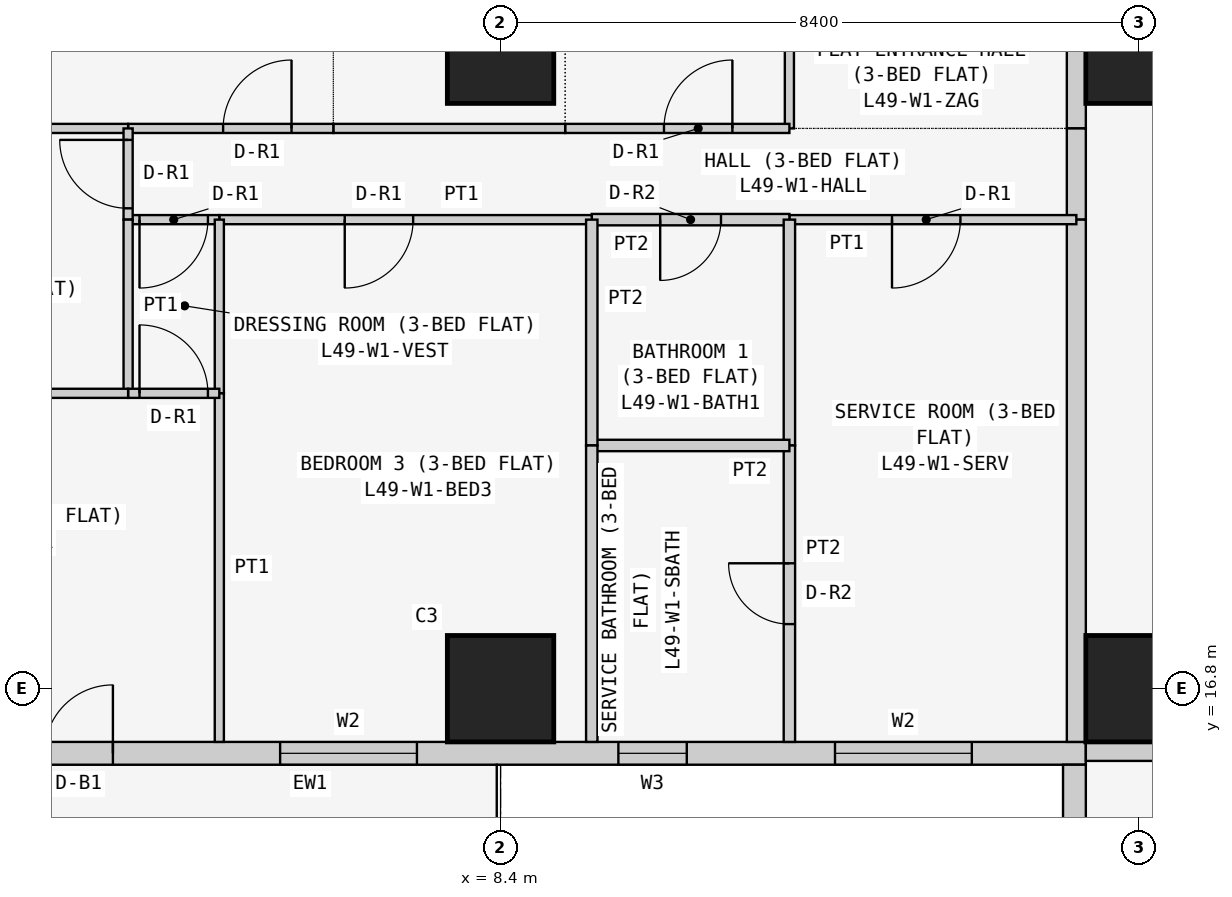
"""IFC4 building model, lengths in metres.
Left out: names, types, materials, properties, quantities, classifications, styles, units other than length and angle.
Written with IfcOpenShell. Run it as: python <this file> out.ifc"""

import sys

from ifc_helpers import new_model, si_unit, direction, frame, frame_2d, origin, origin_2d, place, context, subcontext, project, spatial, rectangle, extrude, element, fill, save


model = new_model("IFC4")
c1 = context("Model", 3, precision=1e-05, world=origin(), true_north=direction((0.0, 1.0)))
c2 = subcontext(c1, "Body", "Model", "MODEL_VIEW")
j1 = project(units=[si_unit("LENGTHUNIT", "METRE"), si_unit("PLANEANGLEUNIT", "RADIAN")], contexts=[c1])
p1 = place(None, origin())
s1 = spatial("IfcSite", under=j1, at=p1, CompositionType="ELEMENT")
p2 = place(p1, origin())
s2 = spatial("IfcBuilding", under=s1, at=p2, CompositionType="ELEMENT")
p3 = place(p2, frame((0.0, 0.0, 190.5)))
s3 = spatial("IfcBuildingStorey", under=s2, at=p3, CompositionType="ELEMENT", Elevation=190.5)
for number, where, z_axis, x_axis in (
    (1, (8.4, 16.8, 0.0), (0.0, 0.0, 1.0), (1.0, 0.0, 0.0)),
    (2, (8.4, 25.2, 0.0), (0.0, 0.0, 1.0), (1.0, 0.0, 0.0)),
    (3, (16.8, 16.8, 0.0), (0.0, 0.0, 1.0), (1.0, 0.0, 0.0)),
    (4, (16.8, 25.2, 0.0), (0.0, 0.0, 1.0), (1.0, 0.0, 0.0)),
):
    element("IfcColumn", number, at=place(p3, frame(where, z_axis=z_axis, x_axis=x_axis)), inside=s3, PredefinedType="COLUMN", context=c2, shape_type="SweptSolid", body=[
        extrude(rectangle(XDim=1.4, YDim=1.4, at=origin_2d()), origin(), (0.0, 0.0, 1.0), 3.6),
    ])
p4 = place(p3, frame((0.4, 15.95, 0.0), z_axis=(0.0, 0.0, 1.0), x_axis=(1.0, 0.0, 0.0)))
e5 = element("IfcWall", 5, at=p4, inside=s3, PredefinedType="SOLIDWALL", context=c2, shape_type="SweptSolid", body=[
    extrude(rectangle(XDim=15.7, YDim=0.3, at=frame_2d((7.85, 0.0))), origin(), (0.0, 0.0, 1.0), 3.45),
])
p5 = place(p4, frame((12.4, 0.0, 0.9)))
e6 = element("IfcOpeningElement", 6, at=p5, cuts=e5, PredefinedType="OPENING", context=c2, shape_type="SweptSolid", body=[
    extrude(rectangle(XDim=1.8, YDim=1.5, at=frame_2d((0.9, 0.75))), frame((0.0, 0.16, 0.0), z_axis=(0.0, -1.0, 0.0), x_axis=(1.0, 0.0, 0.0)), (0.0, 0.0, 1.0), 0.32),
])
p6 = place(p4, frame((9.55, 0.0, 1.5)))
e7 = element("IfcOpeningElement", 7, at=p6, cuts=e5, PredefinedType="OPENING", context=c2, shape_type="SweptSolid", body=[
    extrude(rectangle(XDim=0.9, YDim=0.7, at=frame_2d((0.45, 0.35))), frame((0.0, 0.16, 0.0), z_axis=(0.0, -1.0, 0.0), x_axis=(1.0, 0.0, 0.0)), (0.0, 0.0, 1.0), 0.32),
])
p7 = place(p4, frame((5.1, 0.0, 0.9)))
e8 = element("IfcOpeningElement", 8, at=p7, cuts=e5, PredefinedType="OPENING", context=c2, shape_type="SweptSolid", body=[
    extrude(rectangle(XDim=1.8, YDim=1.5, at=frame_2d((0.9, 0.75))), frame((0.0, 0.16, 0.0), z_axis=(0.0, -1.0, 0.0), x_axis=(1.0, 0.0, 0.0)), (0.0, 0.0, 1.0), 0.32),
])
p8 = place(p4, frame((2.0, 0.0, 0.0)))
e9 = element("IfcOpeningElement", 9, at=p8, cuts=e5, PredefinedType="OPENING", context=c2, shape_type="SweptSolid", body=[
    extrude(rectangle(XDim=0.9, YDim=2.4, at=frame_2d((0.45, 1.2))), frame((0.0, 0.16, 0.0), z_axis=(0.0, -1.0, 0.0), x_axis=(1.0, 0.0, 0.0)), (0.0, 0.0, 1.0), 0.32),
])
p9 = place(p4, frame((0.7, 0.0, 0.9)))
e10 = element("IfcOpeningElement", 10, at=p9, cuts=e5, PredefinedType="OPENING", context=c2, shape_type="SweptSolid", body=[
    extrude(rectangle(XDim=1.2, YDim=1.5, at=frame_2d((0.6, 0.75))), frame((0.0, 0.16, 0.0), z_axis=(0.0, -1.0, 0.0), x_axis=(1.0, 0.0, 0.0)), (0.0, 0.0, 1.0), 0.32),
])
p10 = place(p3, frame((15.95, 15.8, 0.0), z_axis=(0.0, 0.0, 1.0), x_axis=(0.0, -1.0, 0.0)))
e11 = element("IfcWall", 11, at=p10, inside=s3, PredefinedType="SOLIDWALL", context=c2, shape_type="SweptSolid", body=[
    extrude(rectangle(XDim=7.0, YDim=0.3, at=frame_2d((3.5, 0.0))), origin(), (0.0, 0.0, 1.0), 3.45),
])
p11 = place(p10, frame((1.5, 0.0, 0.9)))
e12 = element("IfcOpeningElement", 12, at=p11, cuts=e11, PredefinedType="OPENING", context=c2, shape_type="SweptSolid", body=[
    extrude(rectangle(XDim=2.4, YDim=1.5, at=frame_2d((1.2, 0.75))), frame((0.0, 0.16, 0.0), z_axis=(0.0, -1.0, 0.0), x_axis=(1.0, 0.0, 0.0)), (0.0, 0.0, 1.0), 0.32),
])
p12 = place(p10, frame((5.05, 0.0, 0.9)))
e13 = element("IfcOpeningElement", 13, at=p12, cuts=e11, PredefinedType="OPENING", context=c2, shape_type="SweptSolid", body=[
    extrude(rectangle(XDim=1.2, YDim=1.5, at=frame_2d((0.6, 0.75))), frame((0.0, 0.16, 0.0), z_axis=(0.0, -1.0, 0.0), x_axis=(1.0, 0.0, 0.0)), (0.0, 0.0, 1.0), 0.32),
])
p13 = place(p3, frame((22.971, 15.975, 0.0), z_axis=(0.0, 0.0, 1.0), x_axis=(-1.0, 0.0, 0.0)))
e14 = element("IfcWall", 14, at=p13, inside=s3, PredefinedType="PARTITIONING", context=c2, shape_type="SweptSolid", body=[
    extrude(rectangle(XDim=6.871, YDim=0.25, at=frame_2d((3.436, 0.0))), origin(), (0.0, 0.0, 1.0), 3.45),
])
p14 = place(p3, frame((15.975, 24.171, 0.0), z_axis=(0.0, 0.0, 1.0), x_axis=(0.0, 1.0, 0.0)))
e15 = element("IfcWall", 15, at=p14, inside=s3, PredefinedType="PARTITIONING", context=c2, shape_type="SweptSolid", body=[
    extrude(rectangle(XDim=5.229, YDim=0.25, at=frame_2d((2.615, 0.0))), origin(), (0.0, 0.0, 1.0), 3.45),
])
p15 = place(p14, frame((2.129, 0.0, 0.0)))
e16 = element("IfcOpeningElement", 16, at=p15, cuts=e15, PredefinedType="OPENING", context=c2, shape_type="SweptSolid", body=[
    extrude(rectangle(XDim=1.0, YDim=2.1, at=frame_2d((0.5, 1.05))), frame((0.0, 0.135, 0.0), z_axis=(0.0, -1.0, 0.0), x_axis=(1.0, 0.0, 0.0)), (0.0, 0.0, 1.0), 0.27),
])
p16 = place(p3, frame((15.975, 22.971, 0.0), z_axis=(0.0, 0.0, 1.0), x_axis=(0.0, 1.0, 0.0)))
e17 = element("IfcWall", 17, at=p16, inside=s3, PredefinedType="PARTITIONING", context=c2, shape_type="SweptSolid", body=[
    extrude(rectangle(XDim=1.2, YDim=0.25, at=frame_2d((0.6, 0.0))), origin(), (0.0, 0.0, 1.0), 3.45),
])
p17 = place(p3, frame((15.975, 16.1, 0.0), z_axis=(0.0, 0.0, 1.0), x_axis=(0.0, 1.0, 0.0)))
e18 = element("IfcWall", 18, at=p17, inside=s3, PredefinedType="PARTITIONING", context=c2, shape_type="SweptSolid", body=[
    extrude(rectangle(XDim=6.871, YDim=0.25, at=frame_2d((3.436, 0.0))), origin(), (0.0, 0.0, 1.0), 3.45),
])
p18 = place(p3, frame((12.2, 29.4, 0.0), z_axis=(0.0, 0.0, 1.0), x_axis=(0.0, -1.0, 0.0)))
e19 = element("IfcWall", 19, at=p18, inside=s3, PredefinedType="PARTITIONING", context=c2, shape_type="SweptSolid", body=[
    extrude(rectangle(XDim=5.229, YDim=0.12, at=frame_2d((2.615, 0.0))), origin(), (0.0, 0.0, 1.0), 3.45),
])
p19 = place(p3, frame((9.25, 24.171, 0.0), z_axis=(0.0, 0.0, 1.0), x_axis=(1.0, 0.0, 0.0)))
e20 = element("IfcWall", 20, at=p19, inside=s3, PredefinedType="PARTITIONING", context=c2, shape_type="SweptSolid", body=[
    extrude(rectangle(XDim=2.95, YDim=0.12, at=frame_2d((1.475, 0.0))), origin(), (0.0, 0.0, 1.0), 3.45),
])
p20 = place(p19, frame((1.3, 0.0, 0.0)))
e21 = element("IfcOpeningElement", 21, at=p20, cuts=e20, PredefinedType="OPENING", context=c2, shape_type="SweptSolid", body=[
    extrude(rectangle(XDim=0.9, YDim=2.1, at=frame_2d((0.45, 1.05))), frame((0.0, 0.07, 0.0), z_axis=(0.0, -1.0, 0.0), x_axis=(1.0, 0.0, 0.0)), (0.0, 0.0, 1.0), 0.14),
])
p21 = place(p3, frame((6.2, 24.171, 0.0), z_axis=(0.0, 0.0, 1.0), x_axis=(1.0, 0.0, 0.0)))
e22 = element("IfcWall", 22, at=p21, inside=s3, PredefinedType="PARTITIONING", context=c2, shape_type="SweptSolid", body=[
    extrude(rectangle(XDim=3.05, YDim=0.12, at=frame_2d((1.525, 0.0))), origin(), (0.0, 0.0, 1.0), 3.45),
])
p22 = place(p3, frame((3.5, 24.171, 0.0), z_axis=(0.0, 0.0, 1.0), x_axis=(1.0, 0.0, 0.0)))
e23 = element("IfcWall", 23, at=p22, inside=s3, PredefinedType="PARTITIONING", context=c2, shape_type="SweptSolid", body=[
    extrude(rectangle(XDim=2.7, YDim=0.12, at=frame_2d((1.35, 0.0))), origin(), (0.0, 0.0, 1.0), 3.45),
])
p23 = place(p22, frame((1.25, 0.0, 0.0)))
e24 = element("IfcOpeningElement", 24, at=p23, cuts=e23, PredefinedType="OPENING", context=c2, shape_type="SweptSolid", body=[
    extrude(rectangle(XDim=0.9, YDim=2.1, at=frame_2d((0.45, 1.05))), frame((0.0, 0.07, 0.0), z_axis=(0.0, -1.0, 0.0), x_axis=(1.0, 0.0, 0.0)), (0.0, 0.0, 1.0), 0.14),
])
p24 = place(p3, frame((-0.65, 24.171, 0.0), z_axis=(0.0, 0.0, 1.0), x_axis=(1.0, 0.0, 0.0)))
e25 = element("IfcWall", 25, at=p24, inside=s3, PredefinedType="PARTITIONING", context=c2, shape_type="SweptSolid", body=[
    extrude(rectangle(XDim=4.15, YDim=0.12, at=frame_2d((2.075, 0.0))), origin(), (0.0, 0.0, 1.0), 3.45),
])
p25 = place(p3, frame((12.2, 22.971, 0.0), z_axis=(0.0, 0.0, 1.0), x_axis=(1.0, 0.0, 0.0)))
e26 = element("IfcWall", 26, at=p25, inside=s3, PredefinedType="PARTITIONING", context=c2, shape_type="SweptSolid", body=[
    extrude(rectangle(XDim=3.775, YDim=0.12, at=frame_2d((1.888, 0.0))), origin(), (0.0, 0.0, 1.0), 3.45),
])
p26 = place(p25, frame((1.35, 0.0, 0.0)))
e27 = element("IfcOpeningElement", 27, at=p26, cuts=e26, PredefinedType="OPENING", context=c2, shape_type="SweptSolid", body=[
    extrude(rectangle(XDim=0.9, YDim=2.1, at=frame_2d((0.45, 1.05))), frame((0.0, 0.07, 0.0), z_axis=(0.0, -1.0, 0.0), x_axis=(1.0, 0.0, 0.0)), (0.0, 0.0, 1.0), 0.14),
])
p27 = place(p3, frame((9.6, 22.971, 0.0), z_axis=(0.0, 0.0, 1.0), x_axis=(1.0, 0.0, 0.0)))
e28 = element("IfcWall", 28, at=p27, inside=s3, PredefinedType="PARTITIONING", context=c2, shape_type="SweptSolid", body=[
    extrude(rectangle(XDim=2.6, YDim=0.15, at=frame_2d((1.3, 0.0))), origin(), (0.0, 0.0, 1.0), 3.45),
])
p28 = place(p27, frame((0.9, 0.0, 0.0)))
e29 = element("IfcOpeningElement", 29, at=p28, cuts=e28, PredefinedType="OPENING", context=c2, shape_type="SweptSolid", body=[
    extrude(rectangle(XDim=0.8, YDim=2.1, at=frame_2d((0.4, 1.05))), frame((0.0, 0.085, 0.0), z_axis=(0.0, -1.0, 0.0), x_axis=(1.0, 0.0, 0.0)), (0.0, 0.0, 1.0), 0.17),
])
p29 = place(p3, frame((4.7, 22.971, 0.0), z_axis=(0.0, 0.0, 1.0), x_axis=(1.0, 0.0, 0.0)))
e30 = element("IfcWall", 30, at=p29, inside=s3, PredefinedType="PARTITIONING", context=c2, shape_type="SweptSolid", body=[
    extrude(rectangle(XDim=4.9, YDim=0.12, at=frame_2d((2.45, 0.0))), origin(), (0.0, 0.0, 1.0), 3.45),
])
p30 = place(p29, frame((1.65, 0.0, 0.0)))
e31 = element("IfcOpeningElement", 31, at=p30, cuts=e30, PredefinedType="OPENING", context=c2, shape_type="SweptSolid", body=[
    extrude(rectangle(XDim=0.9, YDim=2.1, at=frame_2d((0.45, 1.05))), frame((0.0, 0.07, 0.0), z_axis=(0.0, -1.0, 0.0), x_axis=(1.0, 0.0, 0.0)), (0.0, 0.0, 1.0), 0.14),
])
p31 = place(p3, frame((3.5, 22.971, 0.0), z_axis=(0.0, 0.0, 1.0), x_axis=(1.0, 0.0, 0.0)))
e32 = element("IfcWall", 32, at=p31, inside=s3, PredefinedType="PARTITIONING", context=c2, shape_type="SweptSolid", body=[
    extrude(rectangle(XDim=1.2, YDim=0.12, at=frame_2d((0.6, 0.0))), origin(), (0.0, 0.0, 1.0), 3.45),
])
p32 = place(p31, frame((0.15, 0.0, 0.0)))
e33 = element("IfcOpeningElement", 33, at=p32, cuts=e32, PredefinedType="OPENING", context=c2, shape_type="SweptSolid", body=[
    extrude(rectangle(XDim=0.9, YDim=2.1, at=frame_2d((0.45, 1.05))), frame((0.0, 0.07, 0.0), z_axis=(0.0, -1.0, 0.0), x_axis=(1.0, 0.0, 0.0)), (0.0, 0.0, 1.0), 0.14),
])
p33 = place(p3, frame((3.5, 24.171, 0.0), z_axis=(0.0, 0.0, 1.0), x_axis=(0.0, -1.0, 0.0)))
e34 = element("IfcWall", 34, at=p33, inside=s3, PredefinedType="PARTITIONING", context=c2, shape_type="SweptSolid", body=[
    extrude(rectangle(XDim=1.2, YDim=0.12, at=frame_2d((0.6, 0.0))), origin(), (0.0, 0.0, 1.0), 3.45),
])
p34 = place(p33, frame((0.151, 0.0, 0.0)))
e35 = element("IfcOpeningElement", 35, at=p34, cuts=e34, PredefinedType="OPENING", context=c2, shape_type="SweptSolid", body=[
    extrude(rectangle(XDim=0.9, YDim=2.1, at=frame_2d((0.45, 1.05))), frame((0.0, 0.07, 0.0), z_axis=(0.0, -1.0, 0.0), x_axis=(1.0, 0.0, 0.0)), (0.0, 0.0, 1.0), 0.14),
])
p35 = place(p3, frame((12.2, 22.971, 0.0), z_axis=(0.0, 0.0, 1.0), x_axis=(0.0, -1.0, 0.0)))
e36 = element("IfcWall", 36, at=p35, inside=s3, PredefinedType="PARTITIONING", context=c2, shape_type="SweptSolid", body=[
    extrude(rectangle(XDim=2.971, YDim=0.15, at=frame_2d((1.485, 0.0))), origin(), (0.0, 0.0, 1.0), 3.45),
])
p36 = place(p3, frame((12.2, 20.0, 0.0), z_axis=(0.0, 0.0, 1.0), x_axis=(0.0, -1.0, 0.0)))
e37 = element("IfcWall", 37, at=p36, inside=s3, PredefinedType="PARTITIONING", context=c2, shape_type="SweptSolid", body=[
    extrude(rectangle(XDim=3.9, YDim=0.15, at=frame_2d((1.95, 0.0))), origin(), (0.0, 0.0, 1.0), 3.45),
])
p37 = place(p36, frame((1.55, 0.0, 0.0)))
e38 = element("IfcOpeningElement", 38, at=p37, cuts=e37, PredefinedType="OPENING", context=c2, shape_type="SweptSolid", body=[
    extrude(rectangle(XDim=0.8, YDim=2.1, at=frame_2d((0.4, 1.05))), frame((0.0, 0.085, 0.0), z_axis=(0.0, -1.0, 0.0), x_axis=(1.0, 0.0, 0.0)), (0.0, 0.0, 1.0), 0.17),
])
p38 = place(p3, frame((9.6, 20.0, 0.0), z_axis=(0.0, 0.0, 1.0), x_axis=(1.0, 0.0, 0.0)))
e39 = element("IfcWall", 39, at=p38, inside=s3, PredefinedType="PARTITIONING", context=c2, shape_type="SweptSolid", body=[
    extrude(rectangle(XDim=2.6, YDim=0.15, at=frame_2d((1.3, 0.0))), origin(), (0.0, 0.0, 1.0), 3.45),
])
p39 = place(p3, frame((9.6, 22.971, 0.0), z_axis=(0.0, 0.0, 1.0), x_axis=(0.0, -1.0, 0.0)))
e40 = element("IfcWall", 40, at=p39, inside=s3, PredefinedType="PARTITIONING", context=c2, shape_type="SweptSolid", body=[
    extrude(rectangle(XDim=2.971, YDim=0.15, at=frame_2d((1.485, 0.0))), origin(), (0.0, 0.0, 1.0), 3.45),
])
p40 = place(p3, frame((9.6, 20.0, 0.0), z_axis=(0.0, 0.0, 1.0), x_axis=(0.0, -1.0, 0.0)))
e41 = element("IfcWall", 41, at=p40, inside=s3, PredefinedType="PARTITIONING", context=c2, shape_type="SweptSolid", body=[
    extrude(rectangle(XDim=3.9, YDim=0.15, at=frame_2d((1.95, 0.0))), origin(), (0.0, 0.0, 1.0), 3.45),
])
p41 = place(p3, frame((4.7, 22.971, 0.0), z_axis=(0.0, 0.0, 1.0), x_axis=(0.0, -1.0, 0.0)))
e42 = element("IfcWall", 42, at=p41, inside=s3, PredefinedType="PARTITIONING", context=c2, shape_type="SweptSolid", body=[
    extrude(rectangle(XDim=2.285, YDim=0.12, at=frame_2d((1.143, 0.0))), origin(), (0.0, 0.0, 1.0), 3.45),
])
p42 = place(p3, frame((4.7, 20.686, 0.0), z_axis=(0.0, 0.0, 1.0), x_axis=(0.0, -1.0, 0.0)))
e43 = element("IfcWall", 43, at=p42, inside=s3, PredefinedType="PARTITIONING", context=c2, shape_type="SweptSolid", body=[
    extrude(rectangle(XDim=4.586, YDim=0.12, at=frame_2d((2.293, 0.0))), origin(), (0.0, 0.0, 1.0), 3.45),
])
p43 = place(p3, frame((3.5, 22.971, 0.0), z_axis=(0.0, 0.0, 1.0), x_axis=(0.0, -1.0, 0.0)))
e44 = element("IfcWall", 44, at=p43, inside=s3, PredefinedType="PARTITIONING", context=c2, shape_type="SweptSolid", body=[
    extrude(rectangle(XDim=2.285, YDim=0.12, at=frame_2d((1.143, 0.0))), origin(), (0.0, 0.0, 1.0), 3.45),
])
p44 = place(p3, frame((3.5, 20.686, 0.0), z_axis=(0.0, 0.0, 1.0), x_axis=(1.0, 0.0, 0.0)))
e45 = element("IfcWall", 45, at=p44, inside=s3, PredefinedType="PARTITIONING", context=c2, shape_type="SweptSolid", body=[
    extrude(rectangle(XDim=1.2, YDim=0.12, at=frame_2d((0.6, 0.0))), origin(), (0.0, 0.0, 1.0), 3.45),
])
p45 = place(p44, frame((0.15, 0.0, 0.0)))
e46 = element("IfcOpeningElement", 46, at=p45, cuts=e45, PredefinedType="OPENING", context=c2, shape_type="SweptSolid", body=[
    extrude(rectangle(XDim=0.9, YDim=2.1, at=frame_2d((0.45, 1.05))), frame((0.0, 0.07, 0.0), z_axis=(0.0, -1.0, 0.0), x_axis=(1.0, 0.0, 0.0)), (0.0, 0.0, 1.0), 0.14),
])
p46 = place(p3, frame((-0.65, 20.686, 0.0), z_axis=(0.0, 0.0, 1.0), x_axis=(1.0, 0.0, 0.0)))
e47 = element("IfcWall", 47, at=p46, inside=s3, PredefinedType="PARTITIONING", context=c2, shape_type="SweptSolid", body=[
    extrude(rectangle(XDim=4.15, YDim=0.12, at=frame_2d((2.075, 0.0))), origin(), (0.0, 0.0, 1.0), 3.45),
])
p47 = place(p5, origin())
e48 = element("IfcWindow", 48, at=p47, inside=s3, PartitioningType="SINGLE_PANEL", PredefinedType="WINDOW", context=c2, shape_type="SweptSolid", body=[
    extrude(rectangle(XDim=1.8, YDim=1.5, at=frame_2d((0.9, 0.75))), frame((0.0, 0.03, 0.0), z_axis=(0.0, -1.0, 0.0), x_axis=(1.0, 0.0, 0.0)), (0.0, 0.0, 1.0), 0.06),
])
fill(e6, e48)
p48 = place(p6, origin())
e49 = element("IfcWindow", 49, at=p48, inside=s3, PartitioningType="SINGLE_PANEL", PredefinedType="WINDOW", context=c2, shape_type="SweptSolid", body=[
    extrude(rectangle(XDim=0.9, YDim=0.7, at=frame_2d((0.45, 0.35))), frame((0.0, 0.03, 0.0), z_axis=(0.0, -1.0, 0.0), x_axis=(1.0, 0.0, 0.0)), (0.0, 0.0, 1.0), 0.06),
])
fill(e7, e49)
p49 = place(p7, origin())
e50 = element("IfcWindow", 50, at=p49, inside=s3, PartitioningType="SINGLE_PANEL", PredefinedType="WINDOW", context=c2, shape_type="SweptSolid", body=[
    extrude(rectangle(XDim=1.8, YDim=1.5, at=frame_2d((0.9, 0.75))), frame((0.0, 0.03, 0.0), z_axis=(0.0, -1.0, 0.0), x_axis=(1.0, 0.0, 0.0)), (0.0, 0.0, 1.0), 0.06),
])
fill(e8, e50)
p50 = place(p8, origin())
e51 = element("IfcDoor", 51, at=p50, inside=s3, OperationType="SINGLE_SWING_RIGHT", PredefinedType="DOOR", context=c2, shape_type="SweptSolid", body=[
    extrude(rectangle(XDim=0.9, YDim=2.4, at=frame_2d((0.45, 1.2))), frame((0.0, 0.025, 0.0), z_axis=(0.0, -1.0, 0.0), x_axis=(1.0, 0.0, 0.0)), (0.0, 0.0, 1.0), 0.05),
])
fill(e9, e51)
p51 = place(p20, origin())
e52 = element("IfcDoor", 52, at=p51, inside=s3, OperationType="SINGLE_SWING_RIGHT", PredefinedType="DOOR", context=c2, shape_type="SweptSolid", body=[
    extrude(rectangle(XDim=0.9, YDim=2.1, at=frame_2d((0.45, 1.05))), frame((0.0, 0.025, 0.0), z_axis=(0.0, -1.0, 0.0), x_axis=(1.0, 0.0, 0.0)), (0.0, 0.0, 1.0), 0.05),
])
fill(e21, e52)
p52 = place(p23, origin())
e53 = element("IfcDoor", 53, at=p52, inside=s3, OperationType="SINGLE_SWING_RIGHT", PredefinedType="DOOR", context=c2, shape_type="SweptSolid", body=[
    extrude(rectangle(XDim=0.9, YDim=2.1, at=frame_2d((0.45, 1.05))), frame((0.0, 0.025, 0.0), z_axis=(0.0, -1.0, 0.0), x_axis=(1.0, 0.0, 0.0)), (0.0, 0.0, 1.0), 0.05),
])
fill(e24, e53)
p53 = place(p26, frame((0.9, 0.0, 0.0), z_axis=(0.0, 0.0, 1.0), x_axis=(-1.0, 0.0, 0.0)))
e54 = element("IfcDoor", 54, at=p53, inside=s3, OperationType="SINGLE_SWING_RIGHT", PredefinedType="DOOR", context=c2, shape_type="SweptSolid", body=[
    extrude(rectangle(XDim=0.9, YDim=2.1, at=frame_2d((0.45, 1.05))), frame((0.0, 0.025, 0.0), z_axis=(0.0, -1.0, 0.0), x_axis=(1.0, 0.0, 0.0)), (0.0, 0.0, 1.0), 0.05),
])
fill(e27, e54)
p54 = place(p37, frame((0.8, 0.0, 0.0), z_axis=(0.0, 0.0, 1.0), x_axis=(-1.0, 0.0, 0.0)))
e55 = element("IfcDoor", 55, at=p54, inside=s3, OperationType="SINGLE_SWING_RIGHT", PredefinedType="DOOR", context=c2, shape_type="SweptSolid", body=[
    extrude(rectangle(XDim=0.8, YDim=2.1, at=frame_2d((0.4, 1.05))), frame((0.0, 0.025, 0.0), z_axis=(0.0, -1.0, 0.0), x_axis=(1.0, 0.0, 0.0)), (0.0, 0.0, 1.0), 0.05),
])
fill(e38, e55)
p55 = place(p28, frame((0.8, 0.0, 0.0), z_axis=(0.0, 0.0, 1.0), x_axis=(-1.0, 0.0, 0.0)))
e56 = element("IfcDoor", 56, at=p55, inside=s3, OperationType="SINGLE_SWING_RIGHT", PredefinedType="DOOR", context=c2, shape_type="SweptSolid", body=[
    extrude(rectangle(XDim=0.8, YDim=2.1, at=frame_2d((0.4, 1.05))), frame((0.0, 0.025, 0.0), z_axis=(0.0, -1.0, 0.0), x_axis=(1.0, 0.0, 0.0)), (0.0, 0.0, 1.0), 0.05),
])
fill(e29, e56)
p56 = place(p30, frame((0.9, 0.0, 0.0), z_axis=(0.0, 0.0, 1.0), x_axis=(-1.0, 0.0, 0.0)))
e57 = element("IfcDoor", 57, at=p56, inside=s3, OperationType="SINGLE_SWING_RIGHT", PredefinedType="DOOR", context=c2, shape_type="SweptSolid", body=[
    extrude(rectangle(XDim=0.9, YDim=2.1, at=frame_2d((0.45, 1.05))), frame((0.0, 0.025, 0.0), z_axis=(0.0, -1.0, 0.0), x_axis=(1.0, 0.0, 0.0)), (0.0, 0.0, 1.0), 0.05),
])
fill(e31, e57)
p57 = place(p32, frame((0.9, 0.0, 0.0), z_axis=(0.0, 0.0, 1.0), x_axis=(-1.0, 0.0, 0.0)))
e58 = element("IfcDoor", 58, at=p57, inside=s3, OperationType="SINGLE_SWING_RIGHT", PredefinedType="DOOR", context=c2, shape_type="SweptSolid", body=[
    extrude(rectangle(XDim=0.9, YDim=2.1, at=frame_2d((0.45, 1.05))), frame((0.0, 0.025, 0.0), z_axis=(0.0, -1.0, 0.0), x_axis=(1.0, 0.0, 0.0)), (0.0, 0.0, 1.0), 0.05),
])
fill(e33, e58)
p58 = place(p45, origin())
e59 = element("IfcDoor", 59, at=p58, inside=s3, OperationType="SINGLE_SWING_LEFT", PredefinedType="DOOR", context=c2, shape_type="SweptSolid", body=[
    extrude(rectangle(XDim=0.9, YDim=2.1, at=frame_2d((0.45, 1.05))), frame((0.0, 0.025, 0.0), z_axis=(0.0, -1.0, 0.0), x_axis=(1.0, 0.0, 0.0)), (0.0, 0.0, 1.0), 0.05),
])
fill(e46, e59)
p59 = place(p34, frame((0.9, 0.0, 0.0), z_axis=(0.0, 0.0, 1.0), x_axis=(-1.0, 0.0, 0.0)))
e60 = element("IfcDoor", 60, at=p59, inside=s3, OperationType="SINGLE_SWING_RIGHT", PredefinedType="DOOR", context=c2, shape_type="SweptSolid", body=[
    extrude(rectangle(XDim=0.9, YDim=2.1, at=frame_2d((0.45, 1.05))), frame((0.0, 0.025, 0.0), z_axis=(0.0, -1.0, 0.0), x_axis=(1.0, 0.0, 0.0)), (0.0, 0.0, 1.0), 0.05),
])
fill(e35, e60)
save(model, sys.argv[1])
